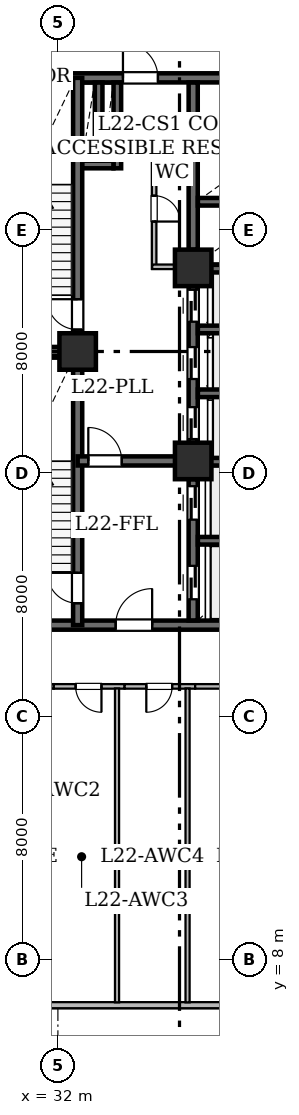
"""IFC4 building model, lengths in metres.
Left out: names, types, materials, properties, quantities, classifications, styles, units other than length and angle.
Written with IfcOpenShell. Run it as: python <this file> out.ifc"""

import sys

from ifc_helpers import new_model, si_unit, direction, frame, frame_2d, origin, origin_2d, place, context, subcontext, project, spatial, rectangle, hollow_rectangle, extrude, element, fill, save


model = new_model("IFC4")
c1 = context("Model", 3, precision=1e-05, world=origin(), true_north=direction((0.0, 1.0)))
c2 = subcontext(c1, "Body", "Model", "MODEL_VIEW")
j1 = project(units=[si_unit("LENGTHUNIT", "METRE"), si_unit("PLANEANGLEUNIT", "RADIAN")], contexts=[c1])
p1 = place(None, origin())
s1 = spatial("IfcSite", under=j1, at=p1, CompositionType="ELEMENT")
p2 = place(p1, origin())
s2 = spatial("IfcBuilding", under=s1, at=p2, CompositionType="ELEMENT")
p3 = place(p2, frame((0.0, 0.0, 89.8)))
s3 = spatial("IfcBuildingStorey", under=s2, at=p3, CompositionType="ELEMENT", Elevation=89.8)
for number, where, z_axis, x_axis in (
    (1, (32.65, 28.0, 0.0), (0.0, 0.0, 1.0), (1.0, 0.0, 0.0)),
    (2, (36.45, 24.4, 0.0), (0.0, 0.0, 1.0), (1.0, 0.0, 0.0)),
    (3, (36.45, 30.75, 0.0), (0.0, 0.0, 1.0), (1.0, 0.0, 0.0)),
):
    element("IfcColumn", number, at=place(p3, frame(where, z_axis=z_axis, x_axis=x_axis)), inside=s3, PredefinedType="COLUMN", context=c2, shape_type="SweptSolid", body=[
        extrude(hollow_rectangle(XDim=1.2, YDim=1.2, WallThickness=0.06, at=origin_2d()), origin(), (0.0, 0.0, 1.0), 4.8),
    ])
p4 = place(p3, frame((52.296, 6.5, 0.0), z_axis=(0.0, 0.0, 1.0), x_axis=(-1.0, 0.0, 0.0)))
e4 = element("IfcWall", 4, at=p4, inside=s3, PredefinedType="STANDARD", context=c2, shape_type="SweptSolid", body=[
    extrude(rectangle(XDim=38.593, YDim=0.2, at=frame_2d((19.296, 0.0))), origin(), (0.0, 0.0, 1.0), 4.58),
])
p5 = place(p4, frame((12.883, 0.0, 0.9)))
e5 = element("IfcOpeningElement", 5, at=p5, cuts=e4, PredefinedType="OPENING", context=c2, shape_type="SweptSolid", body=[
    extrude(rectangle(XDim=1.8, YDim=1.6, at=frame_2d((0.9, 0.8))), frame((0.0, 0.11, 0.0), z_axis=(0.0, -1.0, 0.0), x_axis=(1.0, 0.0, 0.0)), (0.0, 0.0, 1.0), 0.22),
])
p6 = place(p3, frame((29.0, 19.0, 0.0), z_axis=(0.0, 0.0, 1.0), x_axis=(1.0, 0.0, 0.0)))
e6 = element("IfcWall", 6, at=p6, inside=s3, PredefinedType="SHEAR", context=c2, shape_type="SweptSolid", body=[
    extrude(rectangle(XDim=10.4, YDim=0.3, at=frame_2d((5.2, 0.0))), origin(), (0.0, 0.0, 1.0), 4.58),
])
p7 = place(p6, frame((4.9, 0.0, 0.0)))
e7 = element("IfcOpeningElement", 7, at=p7, cuts=e6, PredefinedType="OPENING", context=c2, shape_type="SweptSolid", body=[
    extrude(rectangle(XDim=1.2, YDim=2.15, at=frame_2d((0.6, 1.075))), frame((0.0, 0.16, 0.0), z_axis=(0.0, -1.0, 0.0), x_axis=(1.0, 0.0, 0.0)), (0.0, 0.0, 1.0), 0.32),
])
p8 = place(p3, frame((29.0, 37.0, 0.0), z_axis=(0.0, 0.0, 1.0), x_axis=(1.0, 0.0, 0.0)))
e8 = element("IfcWall", 8, at=p8, inside=s3, PredefinedType="SHEAR", context=c2, shape_type="SweptSolid", body=[
    extrude(rectangle(XDim=10.4, YDim=0.3, at=frame_2d((5.2, 0.0))), origin(), (0.0, 0.0, 1.0), 4.58),
])
p9 = place(p8, frame((5.14, 0.0, 0.0)))
e9 = element("IfcOpeningElement", 9, at=p9, cuts=e8, PredefinedType="OPENING", context=c2, shape_type="SweptSolid", body=[
    extrude(rectangle(XDim=1.15, YDim=2.2, at=frame_2d((0.575, 1.1))), frame((0.0, 0.16, 0.0), z_axis=(0.0, -1.0, 0.0), x_axis=(1.0, 0.0, 0.0)), (0.0, 0.0, 1.0), 0.32),
])
p10 = place(p3, frame((32.65, 19.0, 0.0), z_axis=(0.0, 0.0, 1.0), x_axis=(0.0, 1.0, 0.0)))
e10 = element("IfcWall", 10, at=p10, inside=s3, PredefinedType="SHEAR", context=c2, shape_type="SweptSolid", body=[
    extrude(rectangle(XDim=9.0, YDim=0.3, at=frame_2d((4.5, 0.0))), origin(), (0.0, 0.0, 1.0), 4.58),
])
p11 = place(p10, frame((0.72, 0.0, 0.0)))
e11 = element("IfcOpeningElement", 11, at=p11, cuts=e10, PredefinedType="OPENING", context=c2, shape_type="SweptSolid", body=[
    extrude(rectangle(XDim=1.0, YDim=2.15, at=frame_2d((0.5, 1.075))), frame((0.0, 0.16, 0.0), z_axis=(0.0, -1.0, 0.0), x_axis=(1.0, 0.0, 0.0)), (0.0, 0.0, 1.0), 0.32),
])
p12 = place(p3, frame((32.65, 28.0, 0.0), z_axis=(0.0, 0.0, 1.0), x_axis=(0.0, 1.0, 0.0)))
e12 = element("IfcWall", 12, at=p12, inside=s3, PredefinedType="SHEAR", context=c2, shape_type="SweptSolid", body=[
    extrude(rectangle(XDim=9.0, YDim=0.3, at=frame_2d((4.5, 0.0))), origin(), (0.0, 0.0, 1.0), 4.58),
])
p13 = place(p12, frame((0.72, 0.0, 0.0)))
e13 = element("IfcOpeningElement", 13, at=p13, cuts=e12, PredefinedType="OPENING", context=c2, shape_type="SweptSolid", body=[
    extrude(rectangle(XDim=1.0, YDim=2.15, at=frame_2d((0.5, 1.075))), frame((0.0, 0.16, 0.0), z_axis=(0.0, -1.0, 0.0), x_axis=(1.0, 0.0, 0.0)), (0.0, 0.0, 1.0), 0.32),
])
p14 = place(p3, frame((29.0, 28.0, 0.0), z_axis=(0.0, 0.0, 1.0), x_axis=(1.0, 0.0, 0.0)))
e14 = element("IfcWall", 14, at=p14, inside=s3, PredefinedType="SHEAR", context=c2, shape_type="SweptSolid", body=[
    extrude(rectangle(XDim=3.65, YDim=0.3, at=frame_2d((1.825, 0.0))), origin(), (0.0, 0.0, 1.0), 4.58),
])
p15 = place(p3, frame((32.65, 24.4, 0.0), z_axis=(0.0, 0.0, 1.0), x_axis=(1.0, 0.0, 0.0)))
e15 = element("IfcWall", 15, at=p15, inside=s3, PredefinedType="SHEAR", context=c2, shape_type="SweptSolid", body=[
    extrude(rectangle(XDim=3.8, YDim=0.3, at=frame_2d((1.9, 0.0))), origin(), (0.0, 0.0, 1.0), 4.58),
])
p16 = place(p15, frame((0.35, 0.0, 0.0)))
e16 = element("IfcOpeningElement", 16, at=p16, cuts=e15, PredefinedType="OPENING", context=c2, shape_type="SweptSolid", body=[
    extrude(rectangle(XDim=1.1, YDim=2.15, at=frame_2d((0.55, 1.075))), frame((0.0, 0.16, 0.0), z_axis=(0.0, -1.0, 0.0), x_axis=(1.0, 0.0, 0.0)), (0.0, 0.0, 1.0), 0.32),
])
p17 = place(p3, frame((36.45, 19.154, 0.0), z_axis=(0.0, 0.0, 1.0), x_axis=(0.0, 1.0, 0.0)))
e17 = element("IfcWall", 17, at=p17, inside=s3, PredefinedType="SHEAR", context=c2, shape_type="SweptSolid", body=[
    extrude(rectangle(XDim=4.646, YDim=0.3, at=frame_2d((2.323, 0.0))), origin(), (0.0, 0.0, 1.0), 4.58),
])
p18 = place(p17, frame((0.696, 0.0, 0.0)))
e18 = element("IfcOpeningElement", 18, at=p18, cuts=e17, PredefinedType="OPENING", context=c2, shape_type="SweptSolid", body=[
    extrude(rectangle(XDim=1.1, YDim=2.15, at=frame_2d((0.55, 1.075))), frame((0.0, 0.16, 0.0), z_axis=(0.0, -1.0, 0.0), x_axis=(1.0, 0.0, 0.0)), (0.0, 0.0, 1.0), 0.32),
])
p19 = place(p17, frame((3.316, 0.0, 0.0)))
e19 = element("IfcOpeningElement", 19, at=p19, cuts=e17, PredefinedType="OPENING", context=c2, shape_type="SweptSolid", body=[
    extrude(rectangle(XDim=1.1, YDim=2.15, at=frame_2d((0.55, 1.075))), frame((0.0, 0.16, 0.0), z_axis=(0.0, -1.0, 0.0), x_axis=(1.0, 0.0, 0.0)), (0.0, 0.0, 1.0), 0.32),
])
p20 = place(p3, frame((36.45, 25.0, 0.0), z_axis=(0.0, 0.0, 1.0), x_axis=(0.0, 1.0, 0.0)))
e20 = element("IfcWall", 20, at=p20, inside=s3, PredefinedType="SHEAR", context=c2, shape_type="SweptSolid", body=[
    extrude(rectangle(XDim=5.15, YDim=0.3, at=frame_2d((2.575, 0.0))), origin(), (0.0, 0.0, 1.0), 4.58),
])
p21 = place(p20, frame((0.12, 0.0, 0.0)))
e21 = element("IfcOpeningElement", 21, at=p21, cuts=e20, PredefinedType="OPENING", context=c2, shape_type="SweptSolid", body=[
    extrude(rectangle(XDim=1.05, YDim=2.15, at=frame_2d((0.525, 1.075))), frame((0.0, 0.16, 0.0), z_axis=(0.0, -1.0, 0.0), x_axis=(1.0, 0.0, 0.0)), (0.0, 0.0, 1.0), 0.32),
])
p22 = place(p20, frame((2.095, 0.0, 0.0)))
e22 = element("IfcOpeningElement", 22, at=p22, cuts=e20, PredefinedType="OPENING", context=c2, shape_type="SweptSolid", body=[
    extrude(rectangle(XDim=1.05, YDim=2.15, at=frame_2d((0.525, 1.075))), frame((0.0, 0.16, 0.0), z_axis=(0.0, -1.0, 0.0), x_axis=(1.0, 0.0, 0.0)), (0.0, 0.0, 1.0), 0.32),
])
p23 = place(p20, frame((3.98, 0.0, 0.0)))
e23 = element("IfcOpeningElement", 23, at=p23, cuts=e20, PredefinedType="OPENING", context=c2, shape_type="SweptSolid", body=[
    extrude(rectangle(XDim=1.05, YDim=2.15, at=frame_2d((0.525, 1.075))), frame((0.0, 0.16, 0.0), z_axis=(0.0, -1.0, 0.0), x_axis=(1.0, 0.0, 0.0)), (0.0, 0.0, 1.0), 0.32),
])
p24 = place(p3, frame((36.45, 31.35, 0.0), z_axis=(0.0, 0.0, 1.0), x_axis=(0.0, 1.0, 0.0)))
e24 = element("IfcWall", 24, at=p24, inside=s3, PredefinedType="SHEAR", context=c2, shape_type="SweptSolid", body=[
    extrude(rectangle(XDim=5.496, YDim=0.3, at=frame_2d((2.748, 0.0))), origin(), (0.0, 0.0, 1.0), 4.58),
])
for number, where, z_axis, x_axis in (
    (25, (36.604, 21.775, 0.0), (0.0, 0.0, 1.0), (1.0, 0.0, 0.0)),
    (26, (36.604, 24.375, 0.0), (0.0, 0.0, 1.0), (1.0, 0.0, 0.0)),
    (27, (36.604, 26.625, 0.0), (0.0, 0.0, 1.0), (1.0, 0.0, 0.0)),
    (28, (36.604, 28.725, 0.0), (0.0, 0.0, 1.0), (1.0, 0.0, 0.0)),
    (29, (36.604, 30.725, 0.0), (0.0, 0.0, 1.0), (1.0, 0.0, 0.0)),
    (30, (36.604, 32.925, 0.0), (0.0, 0.0, 1.0), (1.0, 0.0, 0.0)),
    (31, (36.604, 34.975, 0.0), (0.0, 0.0, 1.0), (1.0, 0.0, 0.0)),
):
    element("IfcWall", number, at=place(p3, frame(where, z_axis=z_axis, x_axis=x_axis)), inside=s3, PredefinedType="SHEAR", context=c2, shape_type="SweptSolid", body=[
        extrude(rectangle(XDim=2.642, YDim=0.25, at=frame_2d((1.321, 0.0))), origin(), (0.0, 0.0, 1.0), 4.58),
    ])
p25 = place(p3, frame((33.955, 34.025, 0.0), z_axis=(0.0, 0.0, 1.0), x_axis=(0.0, 1.0, 0.0)))
e32 = element("IfcWall", 32, at=p25, inside=s3, PredefinedType="SHEAR", context=c2, shape_type="SweptSolid", body=[
    extrude(rectangle(XDim=2.821, YDim=0.25, at=frame_2d((1.411, 0.0))), origin(), (0.0, 0.0, 1.0), 4.58),
])
p26 = place(p3, frame((32.804, 34.15, 0.0), z_axis=(0.0, 0.0, 1.0), x_axis=(1.0, 0.0, 0.0)))
e33 = element("IfcWall", 33, at=p26, inside=s3, PredefinedType="SHEAR", context=c2, shape_type="SweptSolid", body=[
    extrude(rectangle(XDim=1.022, YDim=0.25, at=frame_2d((0.511, 0.0))), origin(), (0.0, 0.0, 1.0), 4.58),
])
p27 = place(p3, frame((33.34, 34.279, 0.0), z_axis=(0.0, 0.0, 1.0), x_axis=(0.0, 1.0, 0.0)))
e34 = element("IfcWall", 34, at=p27, inside=s3, PredefinedType="SHEAR", context=c2, shape_type="SweptSolid", body=[
    extrude(rectangle(XDim=2.567, YDim=0.25, at=frame_2d((1.283, 0.0))), origin(), (0.0, 0.0, 1.0), 4.58),
])
p28 = place(p3, frame((36.306, 34.615, 0.0), z_axis=(0.0, 0.0, 1.0), x_axis=(-1.0, 0.0, 0.0)))
e35 = element("IfcWall", 35, at=p28, inside=s3, PredefinedType="STANDARD", context=c2, shape_type="SweptSolid", body=[
    extrude(rectangle(XDim=1.206, YDim=0.15, at=frame_2d((0.603, 0.0))), origin(), (0.0, 0.0, 1.0), 4.58),
])
p29 = place(p3, frame((35.165, 34.678, 0.0), z_axis=(0.0, 0.0, 1.0), x_axis=(0.0, -1.0, 0.0)))
e36 = element("IfcWall", 36, at=p29, inside=s3, PredefinedType="STANDARD", context=c2, shape_type="SweptSolid", body=[
    extrude(rectangle(XDim=3.958, YDim=0.15, at=frame_2d((1.979, 0.0))), origin(), (0.0, 0.0, 1.0), 4.58),
])
p30 = place(p29, frame((1.554, 0.0, 0.0)))
e37 = element("IfcOpeningElement", 37, at=p30, cuts=e36, PredefinedType="OPENING", context=c2, shape_type="SweptSolid", body=[
    extrude(rectangle(XDim=0.85, YDim=2.1, at=frame_2d((0.425, 1.05))), frame((0.0, 0.085, 0.0), z_axis=(0.0, -1.0, 0.0), x_axis=(1.0, 0.0, 0.0)), (0.0, 0.0, 1.0), 0.17),
])
p31 = place(p3, frame((35.102, 30.785, 0.0), z_axis=(0.0, 0.0, 1.0), x_axis=(1.0, 0.0, 0.0)))
e38 = element("IfcWall", 38, at=p31, inside=s3, PredefinedType="STANDARD", context=c2, shape_type="SweptSolid", body=[
    extrude(rectangle(XDim=1.198, YDim=0.15, at=frame_2d((0.599, 0.0))), origin(), (0.0, 0.0, 1.0), 4.58),
])
p32 = place(p3, frame((31.864, 16.985, 0.0), z_axis=(0.0, 0.0, 1.0), x_axis=(-1.0, 0.0, 0.0)))
e39 = element("IfcWall", 39, at=p32, inside=s3, PredefinedType="STANDARD", context=c2, shape_type="SweptSolid", body=[
    extrude(rectangle(XDim=2.33, YDim=0.15, at=frame_2d((1.165, 0.0))), origin(), (0.0, 0.0, 1.0), 4.58),
])
p33 = place(p32, frame((0.761, 0.0, 0.0)))
e40 = element("IfcOpeningElement", 40, at=p33, cuts=e39, PredefinedType="OPENING", context=c2, shape_type="SweptSolid", body=[
    extrude(rectangle(XDim=0.85, YDim=2.1, at=frame_2d((0.425, 1.05))), frame((0.0, 0.085, 0.0), z_axis=(0.0, -1.0, 0.0), x_axis=(1.0, 0.0, 0.0)), (0.0, 0.0, 1.0), 0.17),
])
p34 = place(p3, frame((34.194, 16.985, 0.0), z_axis=(0.0, 0.0, 1.0), x_axis=(-1.0, 0.0, 0.0)))
e41 = element("IfcWall", 41, at=p34, inside=s3, PredefinedType="STANDARD", context=c2, shape_type="SweptSolid", body=[
    extrude(rectangle(XDim=2.33, YDim=0.15, at=frame_2d((1.165, 0.0))), origin(), (0.0, 0.0, 1.0), 4.58),
])
p35 = place(p34, frame((0.761, 0.0, 0.0)))
e42 = element("IfcOpeningElement", 42, at=p35, cuts=e41, PredefinedType="OPENING", context=c2, shape_type="SweptSolid", body=[
    extrude(rectangle(XDim=0.85, YDim=2.1, at=frame_2d((0.425, 1.05))), frame((0.0, 0.085, 0.0), z_axis=(0.0, -1.0, 0.0), x_axis=(1.0, 0.0, 0.0)), (0.0, 0.0, 1.0), 0.17),
])
p36 = place(p3, frame((36.514, 16.985, 0.0), z_axis=(0.0, 0.0, 1.0), x_axis=(-1.0, 0.0, 0.0)))
e43 = element("IfcWall", 43, at=p36, inside=s3, PredefinedType="STANDARD", context=c2, shape_type="SweptSolid", body=[
    extrude(rectangle(XDim=2.32, YDim=0.15, at=frame_2d((1.16, 0.0))), origin(), (0.0, 0.0, 1.0), 4.58),
])
p37 = place(p36, frame((0.756, 0.0, 0.0)))
e44 = element("IfcOpeningElement", 44, at=p37, cuts=e43, PredefinedType="OPENING", context=c2, shape_type="SweptSolid", body=[
    extrude(rectangle(XDim=0.85, YDim=2.1, at=frame_2d((0.425, 1.05))), frame((0.0, 0.085, 0.0), z_axis=(0.0, -1.0, 0.0), x_axis=(1.0, 0.0, 0.0)), (0.0, 0.0, 1.0), 0.17),
])
p38 = place(p3, frame((41.25, 16.985, 0.0), z_axis=(0.0, 0.0, 1.0), x_axis=(-1.0, 0.0, 0.0)))
e45 = element("IfcWall", 45, at=p38, inside=s3, PredefinedType="STANDARD", context=c2, shape_type="SweptSolid", body=[
    extrude(rectangle(XDim=4.736, YDim=0.15, at=frame_2d((2.368, 0.0))), origin(), (0.0, 0.0, 1.0), 3.797),
])
p39 = place(p38, frame((1.918, 0.0, 0.0)))
e46 = element("IfcOpeningElement", 46, at=p39, cuts=e45, PredefinedType="OPENING", context=c2, shape_type="SweptSolid", body=[
    extrude(rectangle(XDim=0.9, YDim=2.1, at=frame_2d((0.45, 1.05))), frame((0.0, 0.085, 0.0), z_axis=(0.0, -1.0, 0.0), x_axis=(1.0, 0.0, 0.0)), (0.0, 0.0, 1.0), 0.17),
])
for number, where, z_axis, x_axis in (
    (47, (33.945, 16.918, 0.0), (0.0, 0.0, 1.0), (0.0, -1.0, 0.0)),
    (48, (36.265, 16.918, 0.0), (0.0, 0.0, 1.0), (0.0, -1.0, 0.0)),
):
    element("IfcWall", number, at=place(p3, frame(where, z_axis=z_axis, x_axis=x_axis)), inside=s3, PredefinedType="PARTITIONING", context=c2, shape_type="SweptSolid", body=[
        extrude(rectangle(XDim=10.326, YDim=0.135, at=frame_2d((5.163, 0.0))), origin(), (0.0, 0.0, 1.0), 4.026),
    ])
p40 = place(p11, origin())
e49 = element("IfcDoor", 49, at=p40, inside=s3, OperationType="SINGLE_SWING_RIGHT", PredefinedType="DOOR", context=c2, shape_type="SweptSolid", body=[
    extrude(rectangle(XDim=1.0, YDim=2.15, at=frame_2d((0.5, 1.075))), frame((0.0, 0.025, 0.0), z_axis=(0.0, -1.0, 0.0), x_axis=(1.0, 0.0, 0.0)), (0.0, 0.0, 1.0), 0.05),
])
fill(e11, e49)
p41 = place(p13, origin())
e50 = element("IfcDoor", 50, at=p41, inside=s3, OperationType="SINGLE_SWING_RIGHT", PredefinedType="DOOR", context=c2, shape_type="SweptSolid", body=[
    extrude(rectangle(XDim=1.0, YDim=2.15, at=frame_2d((0.5, 1.075))), frame((0.0, 0.025, 0.0), z_axis=(0.0, -1.0, 0.0), x_axis=(1.0, 0.0, 0.0)), (0.0, 0.0, 1.0), 0.05),
])
fill(e13, e50)
p42 = place(p16, origin())
e51 = element("IfcDoor", 51, at=p42, inside=s3, OperationType="SINGLE_SWING_LEFT", PredefinedType="DOOR", context=c2, shape_type="SweptSolid", body=[
    extrude(rectangle(XDim=1.1, YDim=2.15, at=frame_2d((0.55, 1.075))), frame((0.0, 0.025, 0.0), z_axis=(0.0, -1.0, 0.0), x_axis=(1.0, 0.0, 0.0)), (0.0, 0.0, 1.0), 0.05),
])
fill(e16, e51)
p43 = place(p7, origin())
e52 = element("IfcDoor", 52, at=p43, inside=s3, OperationType="SINGLE_SWING_RIGHT", PredefinedType="DOOR", context=c2, shape_type="SweptSolid", body=[
    extrude(rectangle(XDim=1.2, YDim=2.15, at=frame_2d((0.6, 1.075))), frame((0.0, 0.025, 0.0), z_axis=(0.0, -1.0, 0.0), x_axis=(1.0, 0.0, 0.0)), (0.0, 0.0, 1.0), 0.05),
])
fill(e7, e52)
p44 = place(p9, origin())
e53 = element("IfcDoor", 53, at=p44, inside=s3, OperationType="SINGLE_SWING_LEFT", PredefinedType="DOOR", context=c2, shape_type="SweptSolid", body=[
    extrude(rectangle(XDim=1.15, YDim=2.2, at=frame_2d((0.575, 1.1))), frame((0.0, 0.025, 0.0), z_axis=(0.0, -1.0, 0.0), x_axis=(1.0, 0.0, 0.0)), (0.0, 0.0, 1.0), 0.05),
])
fill(e9, e53)
p45 = place(p18, origin())
e54 = element("IfcDoor", 54, at=p45, inside=s3, OperationType="SLIDING_TO_LEFT", PredefinedType="DOOR", context=c2, shape_type="SweptSolid", body=[
    extrude(rectangle(XDim=1.1, YDim=2.15, at=frame_2d((0.55, 1.075))), frame((0.0, 0.025, 0.0), z_axis=(0.0, -1.0, 0.0), x_axis=(1.0, 0.0, 0.0)), (0.0, 0.0, 1.0), 0.05),
])
fill(e18, e54)
p46 = place(p19, origin())
e55 = element("IfcDoor", 55, at=p46, inside=s3, OperationType="SLIDING_TO_LEFT", PredefinedType="DOOR", context=c2, shape_type="SweptSolid", body=[
    extrude(rectangle(XDim=1.1, YDim=2.15, at=frame_2d((0.55, 1.075))), frame((0.0, 0.025, 0.0), z_axis=(0.0, -1.0, 0.0), x_axis=(1.0, 0.0, 0.0)), (0.0, 0.0, 1.0), 0.05),
])
fill(e19, e55)
p47 = place(p21, origin())
e56 = element("IfcDoor", 56, at=p47, inside=s3, OperationType="SLIDING_TO_LEFT", PredefinedType="DOOR", context=c2, shape_type="SweptSolid", body=[
    extrude(rectangle(XDim=1.05, YDim=2.15, at=frame_2d((0.525, 1.075))), frame((0.0, 0.025, 0.0), z_axis=(0.0, -1.0, 0.0), x_axis=(1.0, 0.0, 0.0)), (0.0, 0.0, 1.0), 0.05),
])
fill(e21, e56)
p48 = place(p22, origin())
e57 = element("IfcDoor", 57, at=p48, inside=s3, OperationType="SLIDING_TO_LEFT", PredefinedType="DOOR", context=c2, shape_type="SweptSolid", body=[
    extrude(rectangle(XDim=1.05, YDim=2.15, at=frame_2d((0.525, 1.075))), frame((0.0, 0.025, 0.0), z_axis=(0.0, -1.0, 0.0), x_axis=(1.0, 0.0, 0.0)), (0.0, 0.0, 1.0), 0.05),
])
fill(e22, e57)
p49 = place(p23, origin())
e58 = element("IfcDoor", 58, at=p49, inside=s3, OperationType="SLIDING_TO_LEFT", PredefinedType="DOOR", context=c2, shape_type="SweptSolid", body=[
    extrude(rectangle(XDim=1.05, YDim=2.15, at=frame_2d((0.525, 1.075))), frame((0.0, 0.025, 0.0), z_axis=(0.0, -1.0, 0.0), x_axis=(1.0, 0.0, 0.0)), (0.0, 0.0, 1.0), 0.05),
])
fill(e23, e58)
p50 = place(p30, origin())
e59 = element("IfcDoor", 59, at=p50, inside=s3, OperationType="SINGLE_SWING_RIGHT", PredefinedType="DOOR", context=c2, shape_type="SweptSolid", body=[
    extrude(rectangle(XDim=0.85, YDim=2.1, at=frame_2d((0.425, 1.05))), frame((0.0, 0.025, 0.0), z_axis=(0.0, -1.0, 0.0), x_axis=(1.0, 0.0, 0.0)), (0.0, 0.0, 1.0), 0.05),
])
fill(e37, e59)
p51 = place(p35, origin())
e60 = element("IfcDoor", 60, at=p51, inside=s3, OperationType="SINGLE_SWING_LEFT", PredefinedType="DOOR", context=c2, shape_type="SweptSolid", body=[
    extrude(rectangle(XDim=0.85, YDim=2.1, at=frame_2d((0.425, 1.05))), frame((0.0, 0.025, 0.0), z_axis=(0.0, -1.0, 0.0), x_axis=(1.0, 0.0, 0.0)), (0.0, 0.0, 1.0), 0.05),
])
fill(e42, e60)
p52 = place(p37, origin())
e61 = element("IfcDoor", 61, at=p52, inside=s3, OperationType="SINGLE_SWING_RIGHT", PredefinedType="DOOR", context=c2, shape_type="SweptSolid", body=[
    extrude(rectangle(XDim=0.85, YDim=2.1, at=frame_2d((0.425, 1.05))), frame((0.0, 0.025, 0.0), z_axis=(0.0, -1.0, 0.0), x_axis=(1.0, 0.0, 0.0)), (0.0, 0.0, 1.0), 0.05),
])
fill(e44, e61)
save(model, sys.argv[1])
